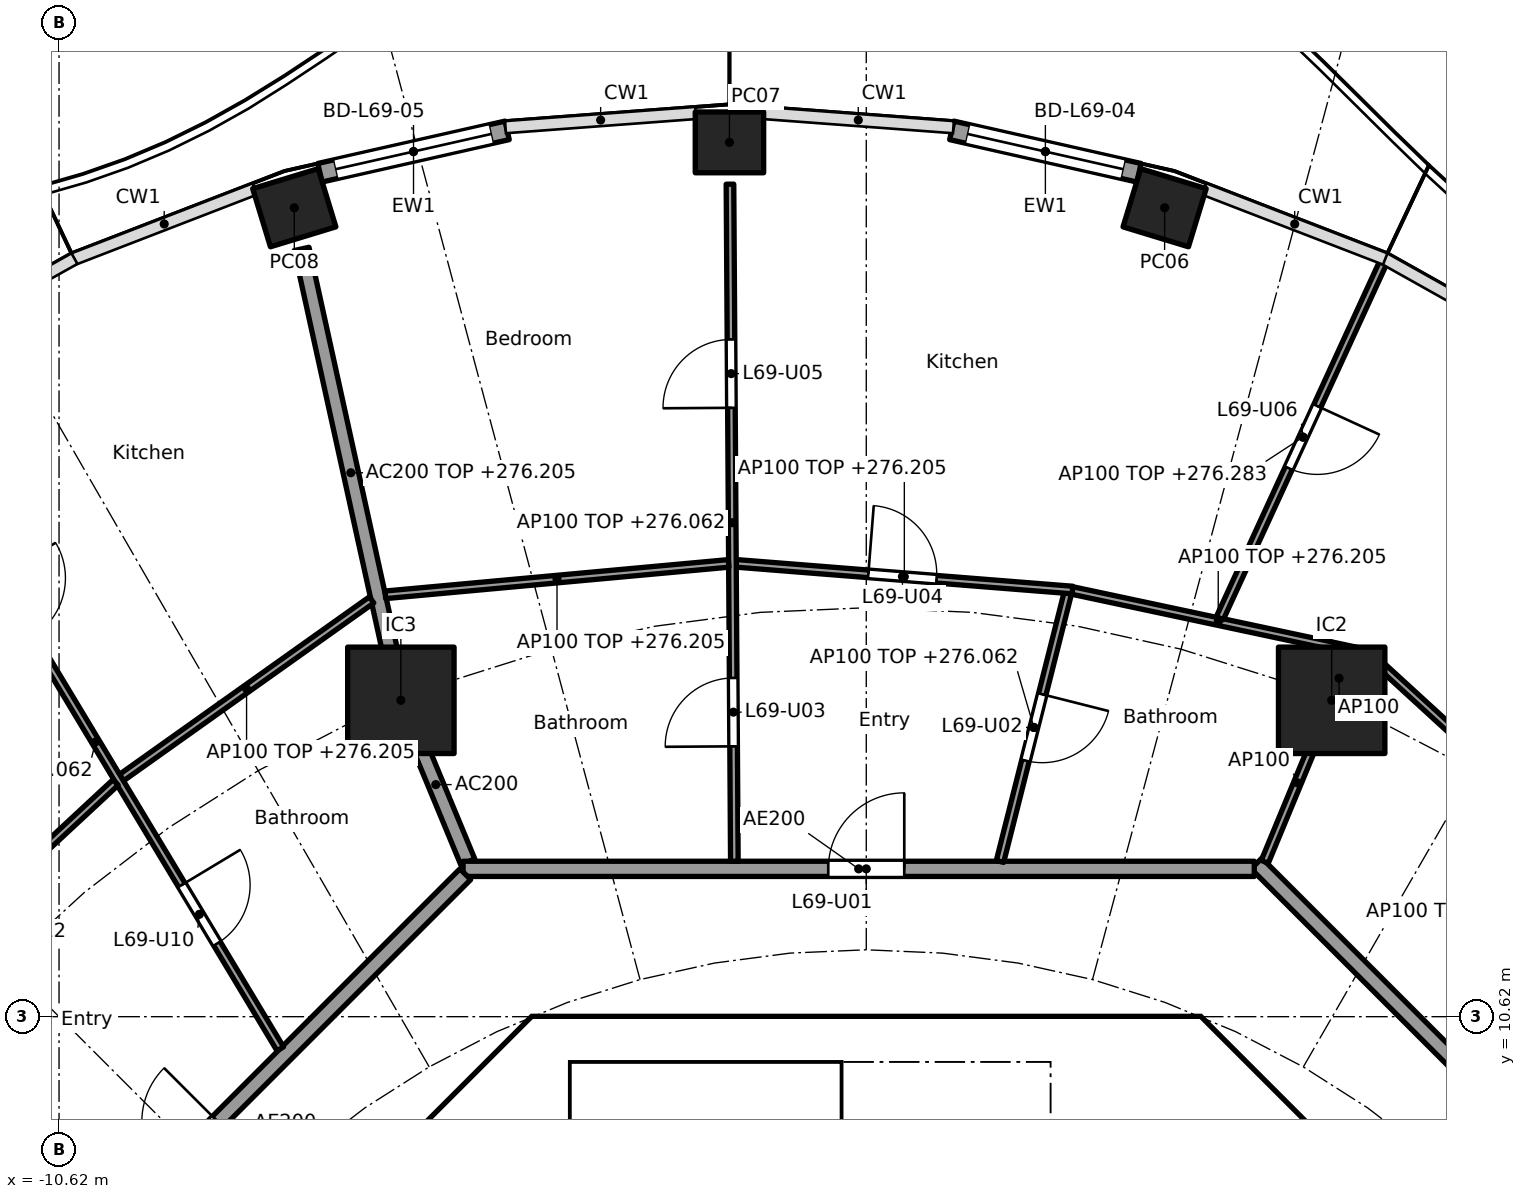
"""IFC4 building model, lengths in metres.
Left out: names, types, materials, properties, quantities, classifications, styles, units other than length and angle.
Written with IfcOpenShell. Run it as: python <this file> out.ifc"""

import sys

from ifc_helpers import new_model, si_unit, direction, frame, frame_2d, origin, origin_2d, place, context, subcontext, project, spatial, polyline, rectangle, hollow_rectangle, outline, extrude, element, fill, save


model = new_model("IFC4")
c1 = context("Model", 3, precision=1e-05, world=origin(), true_north=direction((0.0, 1.0)))
c2 = subcontext(c1, "Body", "Model", "MODEL_VIEW")
j1 = project(units=[si_unit("LENGTHUNIT", "METRE"), si_unit("PLANEANGLEUNIT", "RADIAN")], contexts=[c1])
p1 = place(None, origin())
s1 = spatial("IfcSite", under=j1, at=p1, CompositionType="ELEMENT")
p2 = place(p1, origin())
s2 = spatial("IfcBuilding", under=s1, at=p2, CompositionType="ELEMENT")
p3 = place(p2, frame((0.0, 0.0, 273.3)))
s3 = spatial("IfcBuildingStorey", under=s2, at=p3, CompositionType="ELEMENT", Elevation=273.3)
for number, where, z_axis, x_axis in (
    (1, (3.925, 21.262, 0.0), (0.0, 0.0, 1.0), (-0.957, 0.292, 0.0)),
    (2, (-1.8, 22.122, 0.0), (0.0, 0.0, 1.0), (-1.0, 0.0, 0.0)),
    (3, (-7.525, 21.262, 0.0), (0.0, 0.0, 1.0), (-0.957, -0.292, 0.0)),
):
    element("IfcColumn", number, at=place(p3, frame(where, z_axis=z_axis, x_axis=x_axis)), inside=s3, PredefinedType="COLUMN", context=c2, shape_type="SweptSolid", body=[
        extrude(hollow_rectangle(XDim=0.9, YDim=0.8, WallThickness=0.028, at=origin_2d()), origin(), (0.0, 0.0, 1.0), 3.7),
    ])
for number, where, z_axis, x_axis in (
    (4, (6.123, 14.782, 0.0), (0.0, 0.0, 1.0), (1.0, 0.0, 0.0)),
    (5, (-6.123, 14.782, 0.0), (0.0, 0.0, 1.0), (1.0, 0.0, 0.0)),
):
    element("IfcColumn", number, at=place(p3, frame(where, z_axis=z_axis, x_axis=x_axis)), inside=s3, PredefinedType="COLUMN", context=c2, shape_type="SweptSolid", body=[
        extrude(rectangle(XDim=1.4, YDim=1.4, at=origin_2d()), origin(), (0.0, 0.0, 1.0), 3.7),
    ])
p4 = place(p3, frame((1.125, 22.28, 0.0), z_axis=(0.0, 0.0, 1.0), x_axis=(0.97531487046, -0.22081871175, 0.0)))
e6 = element("IfcWall", 6, at=p4, inside=s3, PredefinedType="SOLIDWALL", context=c2, shape_type="SweptSolid", body=[
    extrude(rectangle(XDim=2.525, YDim=0.25, at=frame_2d((1.263, 0.0))), origin(), (0.0, 0.0, 1.0), 3.44),
])
p5 = place(p4, frame((0.213, 0.0, 0.0)))
e7 = element("IfcOpeningElement", 7, at=p5, cuts=e6, PredefinedType="OPENING", context=c2, shape_type="SweptSolid", body=[
    extrude(rectangle(XDim=2.1, YDim=2.4, at=frame_2d((1.05, 1.2))), frame((0.0, 0.135, 0.0), z_axis=(0.0, -1.0, 0.0), x_axis=(1.0, 0.0, 0.0)), (0.0, 0.0, 1.0), 0.27),
])
p6 = place(p3, frame((-7.188, 21.723, 0.0), z_axis=(0.0, 0.0, 1.0), x_axis=(0.975319584032, 0.220797891756, 0.0)))
e8 = element("IfcWall", 8, at=p6, inside=s3, PredefinedType="SOLIDWALL", context=c2, shape_type="SweptSolid", body=[
    extrude(rectangle(XDim=2.525, YDim=0.25, at=frame_2d((1.263, 0.0))), origin(), (0.0, 0.0, 1.0), 3.44),
])
p7 = place(p6, frame((0.213, 0.0, 0.0)))
e9 = element("IfcOpeningElement", 9, at=p7, cuts=e8, PredefinedType="OPENING", context=c2, shape_type="SweptSolid", body=[
    extrude(rectangle(XDim=2.1, YDim=2.4, at=frame_2d((1.05, 1.2))), frame((0.0, 0.135, 0.0), z_axis=(0.0, -1.0, 0.0), x_axis=(1.0, 0.0, 0.0)), (0.0, 0.0, 1.0), 0.27),
])
p8 = place(p3, frame((9.988, 4.613, 0.0), z_axis=(0.0, 0.0, 1.0), x_axis=(-0.707106781187, 0.707106781187, 0.0)))
e10 = element("IfcWall", 10, at=p8, inside=s3, PredefinedType="SHEAR", context=c2, shape_type="SweptSolid", body=[
    extrude(rectangle(XDim=7.602, YDim=0.6, at=frame_2d((3.801, 0.0))), origin(), (0.0, 0.0, 1.0), 3.44),
])
p9 = place(p8, frame((3.201, 0.0, 0.0)))
e11 = element("IfcOpeningElement", 11, at=p9, cuts=e10, PredefinedType="OPENING", context=c2, shape_type="SweptSolid", body=[
    extrude(rectangle(XDim=1.2, YDim=2.1, at=frame_2d((0.6, 1.05))), frame((0.0, 0.31, 0.0), z_axis=(0.0, -1.0, 0.0), x_axis=(1.0, 0.0, 0.0)), (0.0, 0.0, 1.0), 0.62),
])
p10 = place(p3, frame((-4.613, 9.988, 0.0), z_axis=(0.0, 0.0, 1.0), x_axis=(-0.707106781187, -0.707106781187, 0.0)))
e12 = element("IfcWall", 12, at=p10, inside=s3, PredefinedType="SHEAR", context=c2, shape_type="SweptSolid", body=[
    extrude(rectangle(XDim=7.602, YDim=0.6, at=frame_2d((3.801, 0.0))), origin(), (0.0, 0.0, 1.0), 3.44),
])
p11 = place(p10, frame((0.351, 0.0, 0.0)))
e13 = element("IfcOpeningElement", 13, at=p11, cuts=e12, PredefinedType="OPENING", context=c2, shape_type="SweptSolid", body=[
    extrude(rectangle(XDim=1.1, YDim=2.1, at=frame_2d((0.55, 1.05))), frame((0.0, 0.31, 0.0), z_axis=(0.0, -1.0, 0.0), x_axis=(1.0, 0.0, 0.0)), (0.0, 0.0, 1.0), 0.62),
])
p12 = place(p3, frame((4.0, 7.025, 0.0), z_axis=(0.0, 0.0, 1.0), x_axis=(0.0, 1.0, 0.0)))
e14 = element("IfcWall", 14, at=p12, inside=s3, PredefinedType="SOLIDWALL", context=c2, shape_type="SweptSolid", body=[
    extrude(rectangle(XDim=3.0, YDim=0.2, at=frame_2d((1.5, 0.0))), origin(), (0.0, 0.0, 1.0), 3.44),
])
p13 = place(p12, frame((0.925, 0.0, 0.0)))
e15 = element("IfcOpeningElement", 15, at=p13, cuts=e14, PredefinedType="OPENING", context=c2, shape_type="SweptSolid", body=[
    extrude(rectangle(XDim=1.1, YDim=2.1, at=frame_2d((0.55, 1.05))), frame((0.0, 0.11, 0.0), z_axis=(0.0, -1.0, 0.0), x_axis=(1.0, 0.0, 0.0)), (0.0, 0.0, 1.0), 0.22),
])
p14 = place(p3, origin())
e16 = element("IfcWall", 16, at=p14, inside=s3, PredefinedType="SHEAR", context=c2, shape_type="SweptSolid", body=[
    extrude(outline(polyline([(-4.152, 10.025), (-4.401, 9.776), (-4.825, 10.2), (-4.401, 10.625), (4.401, 10.625), (4.825, 10.2), (4.401, 9.776), (4.152, 10.025), (-4.152, 10.025)])), origin(), (0.0, 0.0, 1.0), 3.44),
])
p15 = place(p3, origin())
e17 = element("IfcWall", 17, at=p15, inside=s3, PredefinedType="SOLIDWALL", context=c2, shape_type="SweptSolid", body=[
    extrude(outline(polyline([(-3.9, 7.025), (-4.1, 7.025), (-4.1, 10.025), (-3.9, 10.025), (-3.9, 7.025)])), origin(), (0.0, 0.0, 1.0), 3.44),
])
p16 = place(p3, frame((-5.243, 12.657, 0.0), z_axis=(0.0, 0.0, 1.0), x_axis=(-0.38273085373, 0.923859888513, 0.0)))
e18 = element("IfcWall", 18, at=p16, inside=s3, PredefinedType="PARTITIONING", context=c2, shape_type="SweptSolid", body=[
    extrude(rectangle(XDim=2.199, YDim=0.2, at=frame_2d((1.1, 0.0))), origin(), (0.0, 0.0, 1.0), 3.44),
])
p17 = place(p3, frame((-6.134, 14.831, 0.0), z_axis=(0.0, 0.0, 1.0), x_axis=(-0.214842475666, 0.976648714047, 0.0)))
e19 = element("IfcWall", 19, at=p17, inside=s3, PredefinedType="PARTITIONING", context=c2, shape_type="SweptSolid", body=[
    extrude(rectangle(XDim=6.031, YDim=0.2, at=frame_2d((3.015, 0.0))), origin(), (0.0, 0.0, 1.0), 2.905),
])
p18 = place(p3, frame((12.635, 5.134, 0.0), z_axis=(0.0, 0.0, 1.0), x_axis=(-0.707106781187, 0.707106781187, 0.0)))
e20 = element("IfcWall", 20, at=p18, inside=s3, PredefinedType="PARTITIONING", context=c2, shape_type="SweptSolid", body=[
    extrude(rectangle(XDim=10.609, YDim=0.2, at=frame_2d((5.305, 0.0))), origin(), (0.0, 0.0, 1.0), 3.44),
])
p19 = place(p3, frame((5.104, 12.565, 0.0), z_axis=(0.0, 0.0, 1.0), x_axis=(-1.0, 0.0, 0.0)))
e21 = element("IfcWall", 21, at=p19, inside=s3, PredefinedType="PARTITIONING", context=c2, shape_type="SweptSolid", body=[
    extrude(rectangle(XDim=10.409, YDim=0.2, at=frame_2d((5.205, 0.0))), origin(), (0.0, 0.0, 1.0), 3.44),
])
p20 = place(p19, frame((4.604, 0.0, 0.0)))
e22 = element("IfcOpeningElement", 22, at=p20, cuts=e21, PredefinedType="OPENING", context=c2, shape_type="SweptSolid", body=[
    extrude(rectangle(XDim=1.0, YDim=2.1, at=frame_2d((0.5, 1.05))), frame((0.0, 0.11, 0.0), z_axis=(0.0, -1.0, 0.0), x_axis=(1.0, 0.0, 0.0)), (0.0, 0.0, 1.0), 0.22),
])
p21 = place(p3, frame((-5.275, 12.494, 0.0), z_axis=(0.0, 0.0, 1.0), x_axis=(-0.707106781187, -0.707106781187, 0.0)))
e23 = element("IfcWall", 23, at=p21, inside=s3, PredefinedType="PARTITIONING", context=c2, shape_type="SweptSolid", body=[
    extrude(rectangle(XDim=10.209, YDim=0.2, at=frame_2d((5.104, 0.0))), origin(), (0.0, 0.0, 1.0), 3.44),
])
p22 = place(p21, frame((4.604, 0.0, 0.0)))
e24 = element("IfcOpeningElement", 24, at=p22, cuts=e23, PredefinedType="OPENING", context=c2, shape_type="SweptSolid", body=[
    extrude(rectangle(XDim=1.0, YDim=2.1, at=frame_2d((0.5, 1.05))), frame((0.0, 0.11, 0.0), z_axis=(0.0, -1.0, 0.0), x_axis=(1.0, 0.0, 0.0)), (0.0, 0.0, 1.0), 0.22),
])
p23 = place(p3, frame((10.972, 11.398, 0.0), z_axis=(0.0, 0.0, 1.0), x_axis=(-0.737838738013, 0.674977034193, 0.0)))
e25 = element("IfcWall", 25, at=p23, inside=s3, PredefinedType="PARTITIONING", context=c2, shape_type="SweptSolid", body=[
    extrude(rectangle(XDim=5.977, YDim=0.1, at=frame_2d((2.989, 0.0))), origin(), (0.0, 0.0, 1.0), 2.905),
])
p24 = place(p23, frame((2.514, 0.0, 0.0)))
e26 = element("IfcOpeningElement", 26, at=p24, cuts=e25, PredefinedType="OPENING", context=c2, shape_type="SweptSolid", body=[
    extrude(rectangle(XDim=0.9, YDim=2.1, at=frame_2d((0.45, 1.05))), frame((0.0, 0.06, 0.0), z_axis=(0.0, -1.0, 0.0), x_axis=(1.0, 0.0, 0.0)), (0.0, 0.0, 1.0), 0.12),
])
p25 = place(p3, frame((5.243, 12.657, 0.0), z_axis=(0.0, 0.0, 1.0), x_axis=(0.382719158442, 0.923864733477, 0.0)))
e27 = element("IfcWall", 27, at=p25, inside=s3, PredefinedType="PARTITIONING", context=c2, shape_type="SweptSolid", body=[
    extrude(rectangle(XDim=2.25, YDim=0.1, at=frame_2d((1.125, 0.0))), origin(), (0.0, 0.0, 1.0), 3.44),
])
p26 = place(p3, frame((6.55, 15.409, 0.0), z_axis=(0.0, 0.0, 1.0), x_axis=(-0.978051195976, 0.208364723621, 0.0)))
e28 = element("IfcWall", 28, at=p26, inside=s3, PredefinedType="PARTITIONING", context=c2, shape_type="SweptSolid", body=[
    extrude(rectangle(XDim=3.924, YDim=0.1, at=frame_2d((1.962, 0.0))), origin(), (0.0, 0.0, 1.0), 2.905),
])
p27 = place(p3, frame((4.651, 15.863, 0.0), z_axis=(0.0, 0.0, 1.0), x_axis=(0.41744196735, 0.908703584176, 0.0)))
e29 = element("IfcWall", 29, at=p27, inside=s3, PredefinedType="PARTITIONING", context=c2, shape_type="SweptSolid", body=[
    extrude(rectangle(XDim=5.242, YDim=0.1, at=frame_2d((2.621, 0.0))), origin(), (0.0, 0.0, 1.0), 2.983),
])
p28 = place(p27, frame((2.171, 0.0, 0.0)))
e30 = element("IfcOpeningElement", 30, at=p28, cuts=e29, PredefinedType="OPENING", context=c2, shape_type="SweptSolid", body=[
    extrude(rectangle(XDim=0.9, YDim=2.1, at=frame_2d((0.45, 1.05))), frame((0.0, 0.06, 0.0), z_axis=(0.0, -1.0, 0.0), x_axis=(1.0, 0.0, 0.0)), (0.0, 0.0, 1.0), 0.12),
])
p29 = place(p3, frame((1.759, 12.662, 0.0), z_axis=(0.0, 0.0, 1.0), x_axis=(0.244966765147, 0.969531476525, 0.0)))
e31 = element("IfcWall", 31, at=p29, inside=s3, PredefinedType="PARTITIONING", context=c2, shape_type="SweptSolid", body=[
    extrude(rectangle(XDim=3.638, YDim=0.1, at=frame_2d((1.819, 0.0))), origin(), (0.0, 0.0, 1.0), 2.762),
])
p30 = place(p29, frame((1.369, 0.0, 0.0)))
e32 = element("IfcOpeningElement", 32, at=p30, cuts=e31, PredefinedType="OPENING", context=c2, shape_type="SweptSolid", body=[
    extrude(rectangle(XDim=0.9, YDim=2.1, at=frame_2d((0.45, 1.05))), frame((0.0, 0.06, 0.0), z_axis=(0.0, -1.0, 0.0), x_axis=(1.0, 0.0, 0.0)), (0.0, 0.0, 1.0), 0.12),
])
p31 = place(p3, frame((2.713, 16.233, 0.0), z_axis=(0.0, 0.0, 1.0), x_axis=(-0.996870142942, 0.079056423588, 0.0)))
e33 = element("IfcWall", 33, at=p31, inside=s3, PredefinedType="PARTITIONING", context=c2, shape_type="SweptSolid", body=[
    extrude(rectangle(XDim=4.438, YDim=0.1, at=frame_2d((2.219, 0.0))), origin(), (0.0, 0.0, 1.0), 2.905),
])
p32 = place(p31, frame((1.794, 0.0, 0.0)))
e34 = element("IfcOpeningElement", 34, at=p32, cuts=e33, PredefinedType="OPENING", context=c2, shape_type="SweptSolid", body=[
    extrude(rectangle(XDim=0.9, YDim=2.1, at=frame_2d((0.45, 1.05))), frame((0.0, 0.06, 0.0), z_axis=(0.0, -1.0, 0.0), x_axis=(1.0, 0.0, 0.0)), (0.0, 0.0, 1.0), 0.12),
])
p33 = place(p3, frame((-1.736, 12.665, 0.0), z_axis=(0.0, 0.0, 1.0), x_axis=(-0.00646827636, 0.999979080482, 0.0)))
e35 = element("IfcWall", 35, at=p33, inside=s3, PredefinedType="PARTITIONING", context=c2, shape_type="SweptSolid", body=[
    extrude(rectangle(XDim=8.908, YDim=0.1, at=frame_2d((4.454, 0.0))), origin(), (0.0, 0.0, 1.0), 2.762),
])
p34 = place(p33, frame((1.512, 0.0, 0.0)))
e36 = element("IfcOpeningElement", 36, at=p34, cuts=e35, PredefinedType="OPENING", context=c2, shape_type="SweptSolid", body=[
    extrude(rectangle(XDim=0.9, YDim=2.1, at=frame_2d((0.45, 1.05))), frame((0.0, 0.06, 0.0), z_axis=(0.0, -1.0, 0.0), x_axis=(1.0, 0.0, 0.0)), (0.0, 0.0, 1.0), 0.12),
])
p35 = place(p33, frame((5.965, 0.0, 0.0)))
e37 = element("IfcOpeningElement", 37, at=p35, cuts=e35, PredefinedType="OPENING", context=c2, shape_type="SweptSolid", body=[
    extrude(rectangle(XDim=0.9, YDim=2.1, at=frame_2d((0.45, 1.05))), frame((0.0, 0.06, 0.0), z_axis=(0.0, -1.0, 0.0), x_axis=(1.0, 0.0, 0.0)), (0.0, 0.0, 1.0), 0.12),
])
p36 = place(p3, frame((-1.811, 16.583, 0.0), z_axis=(0.0, 0.0, 1.0), x_axis=(-0.995842301034, -0.091093970555, 0.0)))
e38 = element("IfcWall", 38, at=p36, inside=s3, PredefinedType="PARTITIONING", context=c2, shape_type="SweptSolid", body=[
    extrude(rectangle(XDim=4.535, YDim=0.1, at=frame_2d((2.267, 0.0))), origin(), (0.0, 0.0, 1.0), 2.905),
])
p37 = place(p3, frame((-6.508, 16.103, 0.0), z_axis=(0.0, 0.0, 1.0), x_axis=(-0.815202203556, -0.579176456114, 0.0)))
e39 = element("IfcWall", 39, at=p37, inside=s3, PredefinedType="PARTITIONING", context=c2, shape_type="SweptSolid", body=[
    extrude(rectangle(XDim=4.036, YDim=0.1, at=frame_2d((2.018, 0.0))), origin(), (0.0, 0.0, 1.0), 2.905),
])
p38 = place(p3, frame((-7.709, 10.197, 0.0), z_axis=(0.0, 0.0, 1.0), x_axis=(-0.515516160663, 0.856879856278, 0.0)))
e40 = element("IfcWall", 40, at=p38, inside=s3, PredefinedType="PARTITIONING", context=c2, shape_type="SweptSolid", body=[
    extrude(rectangle(XDim=9.426, YDim=0.1, at=frame_2d((4.713, 0.0))), origin(), (0.0, 0.0, 1.0), 2.762),
])
p39 = place(p38, frame((1.615, 0.0, 0.0)))
e41 = element("IfcOpeningElement", 41, at=p39, cuts=e40, PredefinedType="OPENING", context=c2, shape_type="SweptSolid", body=[
    extrude(rectangle(XDim=0.9, YDim=2.1, at=frame_2d((0.45, 1.05))), frame((0.0, 0.06, 0.0), z_axis=(0.0, -1.0, 0.0), x_axis=(1.0, 0.0, 0.0)), (0.0, 0.0, 1.0), 0.12),
])
p40 = place(p38, frame((6.328, 0.0, 0.0)))
e42 = element("IfcOpeningElement", 42, at=p40, cuts=e40, PredefinedType="OPENING", context=c2, shape_type="SweptSolid", body=[
    extrude(rectangle(XDim=0.9, YDim=2.1, at=frame_2d((0.45, 1.05))), frame((0.0, 0.06, 0.0), z_axis=(0.0, -1.0, 0.0), x_axis=(1.0, 0.0, 0.0)), (0.0, 0.0, 1.0), 0.12),
])
p41 = place(p3, frame((-9.875, 13.702, 0.0), z_axis=(0.0, 0.0, 1.0), x_axis=(-0.732618266441, -0.680639754699, 0.0)))
e43 = element("IfcWall", 43, at=p41, inside=s3, PredefinedType="PARTITIONING", context=c2, shape_type="SweptSolid", body=[
    extrude(rectangle(XDim=4.467, YDim=0.1, at=frame_2d((2.233, 0.0))), origin(), (0.0, 0.0, 1.0), 2.905),
])
p42 = place(p41, frame((1.783, 0.0, 0.0)))
e44 = element("IfcOpeningElement", 44, at=p42, cuts=e43, PredefinedType="OPENING", context=c2, shape_type="SweptSolid", body=[
    extrude(rectangle(XDim=0.9, YDim=2.1, at=frame_2d((0.45, 1.05))), frame((0.0, 0.06, 0.0), z_axis=(0.0, -1.0, 0.0), x_axis=(1.0, 0.0, 0.0)), (0.0, 0.0, 1.0), 0.12),
])
p43 = place(p3, frame((-10.183, 7.727, 0.0), z_axis=(0.0, 0.0, 1.0), x_axis=(-0.719063433856, 0.694944442449, 0.0)))
e45 = element("IfcWall", 45, at=p43, inside=s3, PredefinedType="PARTITIONING", context=c2, shape_type="SweptSolid", body=[
    extrude(rectangle(XDim=9.535, YDim=0.1, at=frame_2d((4.768, 0.0))), origin(), (0.0, 0.0, 1.0), 2.762),
])
p44 = place(p43, frame((1.637, 0.0, 0.0)))
e46 = element("IfcOpeningElement", 46, at=p44, cuts=e45, PredefinedType="OPENING", context=c2, shape_type="SweptSolid", body=[
    extrude(rectangle(XDim=0.9, YDim=2.1, at=frame_2d((0.45, 1.05))), frame((0.0, 0.06, 0.0), z_axis=(0.0, -1.0, 0.0), x_axis=(1.0, 0.0, 0.0)), (0.0, 0.0, 1.0), 0.12),
])
p45 = place(p43, frame((6.405, 0.0, 0.0)))
e47 = element("IfcOpeningElement", 47, at=p45, cuts=e45, PredefinedType="OPENING", context=c2, shape_type="SweptSolid", body=[
    extrude(rectangle(XDim=0.9, YDim=2.1, at=frame_2d((0.45, 1.05))), frame((0.0, 0.06, 0.0), z_axis=(0.0, -1.0, 0.0), x_axis=(1.0, 0.0, 0.0)), (0.0, 0.0, 1.0), 0.12),
])
p46 = place(p3, frame((6.388, 15.29, 0.0), z_axis=(0.0, 0.0, 1.0), x_axis=(-0.610612392422, -0.791929609385, 0.0)))
e48 = element("IfcWall", 48, at=p46, inside=s3, PredefinedType="PARTITIONING", context=c2, shape_type="SweptSolid", body=[
    extrude(rectangle(XDim=0.549, YDim=0.1, at=frame_2d((0.275, 0.0))), origin(), (0.0, 0.0, 1.0), 3.44),
])
p47 = place(p5, origin())
e49 = element("IfcDoor", 49, at=p47, inside=s3, OperationType="SLIDING_TO_LEFT", PredefinedType="DOOR", context=c2, shape_type="SweptSolid", body=[
    extrude(rectangle(XDim=2.1, YDim=2.4, at=frame_2d((1.05, 1.2))), frame((0.0, 0.025, 0.0), z_axis=(0.0, -1.0, 0.0), x_axis=(1.0, 0.0, 0.0)), (0.0, 0.0, 1.0), 0.05),
])
fill(e7, e49)
p48 = place(p7, origin())
e50 = element("IfcDoor", 50, at=p48, inside=s3, OperationType="SLIDING_TO_LEFT", PredefinedType="DOOR", context=c2, shape_type="SweptSolid", body=[
    extrude(rectangle(XDim=2.1, YDim=2.4, at=frame_2d((1.05, 1.2))), frame((0.0, 0.025, 0.0), z_axis=(0.0, -1.0, 0.0), x_axis=(1.0, 0.0, 0.0)), (0.0, 0.0, 1.0), 0.05),
])
fill(e9, e50)
p49 = place(p11, origin())
e51 = element("IfcDoor", 51, at=p49, inside=s3, OperationType="SINGLE_SWING_RIGHT", PredefinedType="DOOR", context=c2, shape_type="SweptSolid", body=[
    extrude(rectangle(XDim=1.1, YDim=2.1, at=frame_2d((0.55, 1.05))), frame((0.0, 0.025, 0.0), z_axis=(0.0, -1.0, 0.0), x_axis=(1.0, 0.0, 0.0)), (0.0, 0.0, 1.0), 0.05),
])
fill(e13, e51)
p50 = place(p20, frame((1.0, 0.0, 0.0), x_axis=(-1.0, 0.0, 0.0)))
e52 = element("IfcDoor", 52, at=p50, inside=s3, OperationType="SINGLE_SWING_RIGHT", PredefinedType="DOOR", context=c2, shape_type="SweptSolid", body=[
    extrude(rectangle(XDim=1.0, YDim=2.1, at=frame_2d((0.5, 1.05))), frame((0.0, 0.025, 0.0), z_axis=(0.0, -1.0, 0.0), x_axis=(1.0, 0.0, 0.0)), (0.0, 0.0, 1.0), 0.05),
])
fill(e22, e52)
p51 = place(p30, frame((0.9, 0.0, 0.0), x_axis=(-1.0, 0.0, 0.0)))
e53 = element("IfcDoor", 53, at=p51, inside=s3, OperationType="SINGLE_SWING_LEFT", PredefinedType="DOOR", context=c2, shape_type="SweptSolid", body=[
    extrude(rectangle(XDim=0.9, YDim=2.1, at=frame_2d((0.45, 1.05))), frame((0.0, 0.025, 0.0), z_axis=(0.0, -1.0, 0.0), x_axis=(1.0, 0.0, 0.0)), (0.0, 0.0, 1.0), 0.05),
])
fill(e32, e53)
p52 = place(p34, origin())
e54 = element("IfcDoor", 54, at=p52, inside=s3, OperationType="SINGLE_SWING_LEFT", PredefinedType="DOOR", context=c2, shape_type="SweptSolid", body=[
    extrude(rectangle(XDim=0.9, YDim=2.1, at=frame_2d((0.45, 1.05))), frame((0.0, 0.025, 0.0), z_axis=(0.0, -1.0, 0.0), x_axis=(1.0, 0.0, 0.0)), (0.0, 0.0, 1.0), 0.05),
])
fill(e36, e54)
p53 = place(p32, frame((0.9, 0.0, 0.0), x_axis=(-1.0, 0.0, 0.0)))
e55 = element("IfcDoor", 55, at=p53, inside=s3, OperationType="SINGLE_SWING_LEFT", PredefinedType="DOOR", context=c2, shape_type="SweptSolid", body=[
    extrude(rectangle(XDim=0.9, YDim=2.1, at=frame_2d((0.45, 1.05))), frame((0.0, 0.025, 0.0), z_axis=(0.0, -1.0, 0.0), x_axis=(1.0, 0.0, 0.0)), (0.0, 0.0, 1.0), 0.05),
])
fill(e34, e55)
p54 = place(p35, origin())
e56 = element("IfcDoor", 56, at=p54, inside=s3, OperationType="SINGLE_SWING_LEFT", PredefinedType="DOOR", context=c2, shape_type="SweptSolid", body=[
    extrude(rectangle(XDim=0.9, YDim=2.1, at=frame_2d((0.45, 1.05))), frame((0.0, 0.025, 0.0), z_axis=(0.0, -1.0, 0.0), x_axis=(1.0, 0.0, 0.0)), (0.0, 0.0, 1.0), 0.05),
])
fill(e37, e56)
p55 = place(p28, frame((0.9, 0.0, 0.0), x_axis=(-1.0, 0.0, 0.0)))
e57 = element("IfcDoor", 57, at=p55, inside=s3, OperationType="SINGLE_SWING_LEFT", PredefinedType="DOOR", context=c2, shape_type="SweptSolid", body=[
    extrude(rectangle(XDim=0.9, YDim=2.1, at=frame_2d((0.45, 1.05))), frame((0.0, 0.025, 0.0), z_axis=(0.0, -1.0, 0.0), x_axis=(1.0, 0.0, 0.0)), (0.0, 0.0, 1.0), 0.05),
])
fill(e30, e57)
p56 = place(p39, frame((0.9, 0.0, 0.0), x_axis=(-1.0, 0.0, 0.0)))
e58 = element("IfcDoor", 58, at=p56, inside=s3, OperationType="SINGLE_SWING_LEFT", PredefinedType="DOOR", context=c2, shape_type="SweptSolid", body=[
    extrude(rectangle(XDim=0.9, YDim=2.1, at=frame_2d((0.45, 1.05))), frame((0.0, 0.025, 0.0), z_axis=(0.0, -1.0, 0.0), x_axis=(1.0, 0.0, 0.0)), (0.0, 0.0, 1.0), 0.05),
])
fill(e41, e58)
save(model, sys.argv[1])
